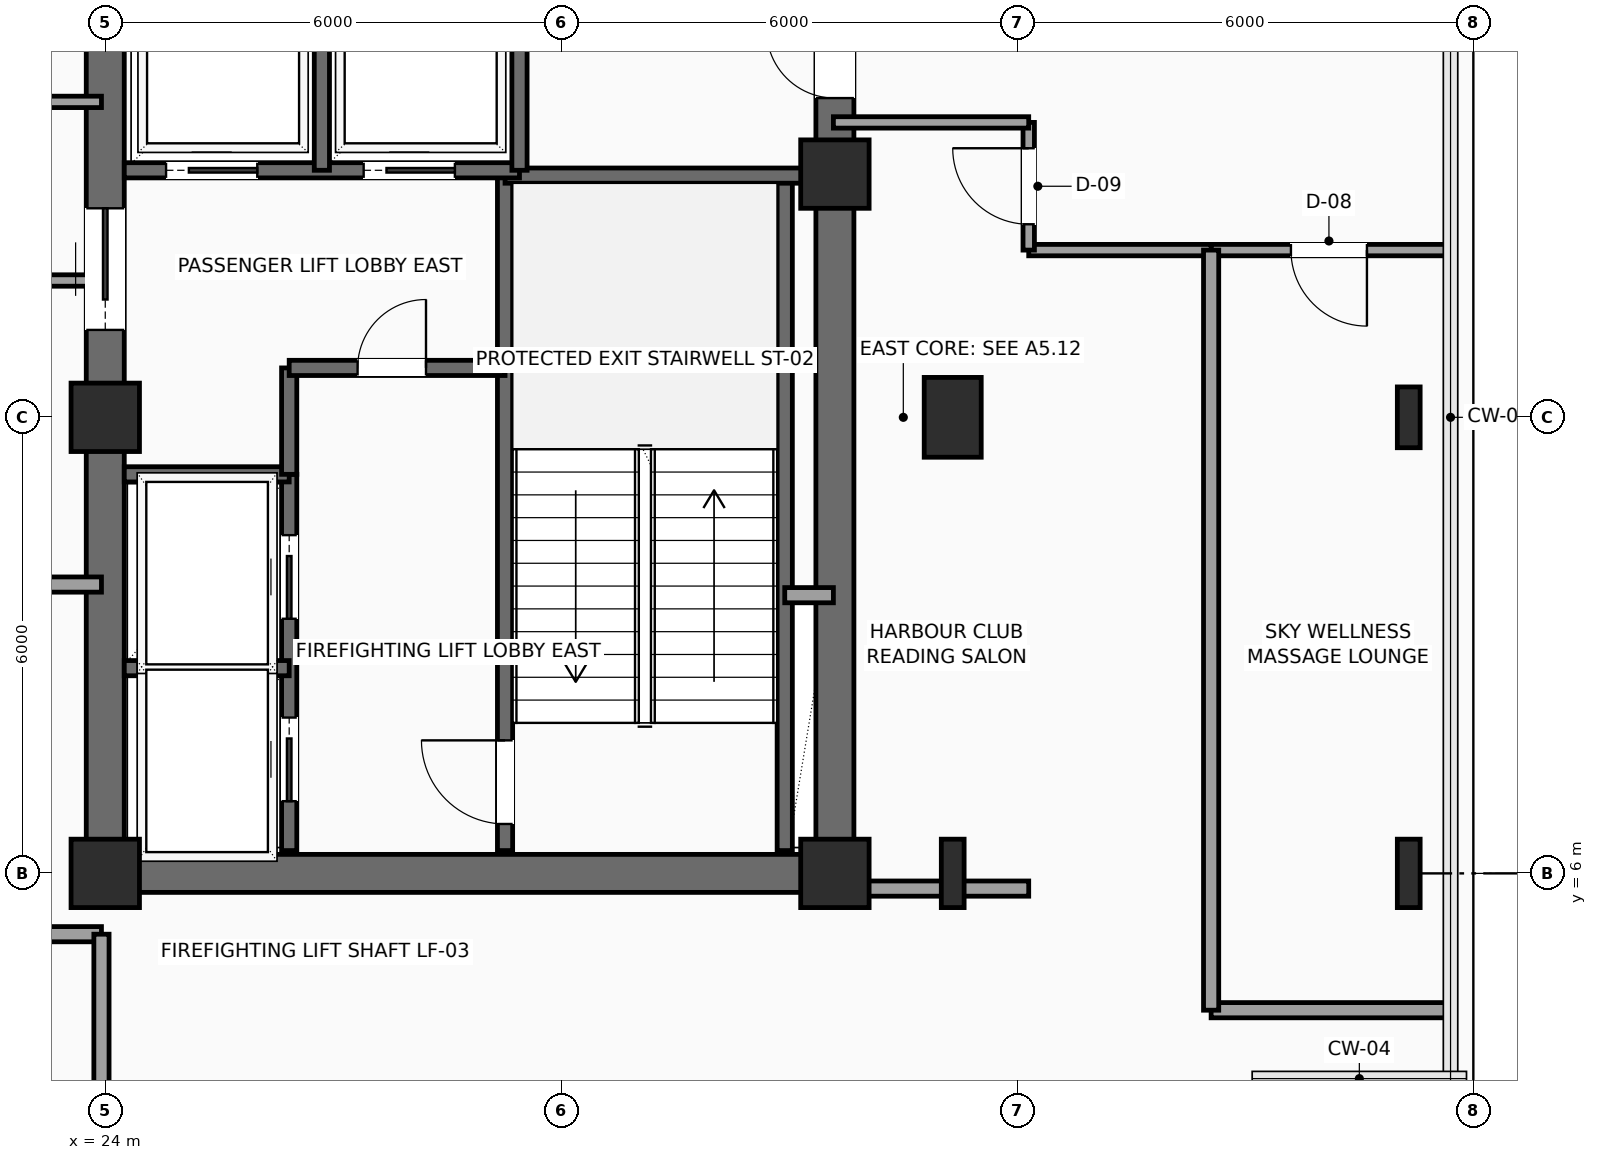
"""IFC4 building model, lengths in metres.
Left out: names, types, materials, properties, quantities, classifications, styles, units other than length and angle.
Written with IfcOpenShell. Run it as: python <this file> out.ifc"""

import sys

from ifc_helpers import new_model, si_unit, direction, frame, frame_2d, origin, origin_2d, place, context, subcontext, project, spatial, rectangle, i_section, extrude, element, fill, save


model = new_model("IFC4")
c1 = context("Model", 3, precision=1e-05, world=origin(), true_north=direction((0.0, 1.0)))
c2 = subcontext(c1, "Body", "Model", "MODEL_VIEW")
j1 = project(units=[si_unit("LENGTHUNIT", "METRE"), si_unit("PLANEANGLEUNIT", "RADIAN")], contexts=[c1])
p1 = place(None, origin())
s1 = spatial("IfcSite", under=j1, at=p1, CompositionType="ELEMENT")
p2 = place(p1, origin())
s2 = spatial("IfcBuilding", under=s1, at=p2, CompositionType="ELEMENT")
p3 = place(p2, frame((0.0, 0.0, 227.4)))
s3 = spatial("IfcBuildingStorey", under=s2, at=p3, CompositionType="ELEMENT", Elevation=227.4)
for number, where, z_axis, x_axis in (
    (1, (24.0, 6.0, 0.0), (0.0, 0.0, 1.0), (1.0, 0.0, 0.0)),
    (2, (24.0, 12.0, 0.0), (0.0, 0.0, 1.0), (1.0, 0.0, 0.0)),
    (3, (33.6, 6.0, 0.0), (0.0, 0.0, 1.0), (1.0, 0.0, 0.0)),
    (4, (33.6, 15.2, 0.0), (0.0, 0.0, 1.0), (1.0, 0.0, 0.0)),
):
    element("IfcColumn", number, at=place(p3, frame(where, z_axis=z_axis, x_axis=x_axis)), inside=s3, PredefinedType="COLUMN", context=c2, shape_type="SweptSolid", body=[
        extrude(rectangle(XDim=0.9, YDim=0.9, at=origin_2d()), origin(), (0.0, 0.0, 1.0), 3.75),
    ])
p4 = place(p3, frame((35.15, 6.0, 0.0), z_axis=(0.0, 0.0, 1.0), x_axis=(1.0, 0.0, 0.0)))
e5 = element("IfcColumn", 5, at=p4, inside=s3, PredefinedType="COLUMN", context=c2, shape_type="SweptSolid", body=[
    extrude(i_section(OverallWidth=0.3, OverallDepth=0.9, WebThickness=0.019, FlangeThickness=0.035, FilletRadius=0.03, at=origin_2d()), origin(), (0.0, 0.0, 1.0), 3.75),
])
p5 = place(p3, frame((35.15, 12.0, 0.0), z_axis=(0.0, 0.0, 1.0), x_axis=(1.0, 0.0, 0.0)))
e6 = element("IfcColumn", 6, at=p5, inside=s3, PredefinedType="COLUMN", context=c2, shape_type="SweptSolid", body=[
    extrude(rectangle(XDim=0.75, YDim=1.05, at=origin_2d()), origin(), (0.0, 0.0, 1.0), 3.75),
])
p6 = place(p3, frame((41.15, 6.0, 0.0), z_axis=(0.0, 0.0, 1.0), x_axis=(1.0, 0.0, 0.0)))
e7 = element("IfcColumn", 7, at=p6, inside=s3, PredefinedType="COLUMN", context=c2, shape_type="SweptSolid", body=[
    extrude(i_section(OverallWidth=0.3, OverallDepth=0.9, WebThickness=0.019, FlangeThickness=0.035, FilletRadius=0.03, at=origin_2d()), origin(), (0.0, 0.0, 1.0), 3.75),
])
p7 = place(p3, frame((41.15, 12.0, 0.0), z_axis=(0.0, 0.0, 1.0), x_axis=(1.0, 0.0, 0.0)))
e8 = element("IfcColumn", 8, at=p7, inside=s3, PredefinedType="COLUMN", context=c2, shape_type="SweptSolid", body=[
    extrude(i_section(OverallWidth=0.3, OverallDepth=0.8, WebThickness=0.018, FlangeThickness=0.033, FilletRadius=0.03, at=origin_2d()), origin(), (0.0, 0.0, 1.0), 3.75),
])
p8 = place(p3, frame((24.0, 6.0, 0.0), z_axis=(0.0, 0.0, 1.0), x_axis=(1.0, 0.0, 0.0)))
e9 = element("IfcWall", 9, at=p8, inside=s3, PredefinedType="SHEAR", context=c2, shape_type="SweptSolid", body=[
    extrude(rectangle(XDim=9.6, YDim=0.5, at=frame_2d((4.8, 0.0))), origin(), (0.0, 0.0, 1.0), 3.54),
])
p9 = place(p3, frame((24.0, 6.0, 0.0), z_axis=(0.0, 0.0, 1.0), x_axis=(0.0, 1.0, 0.0)))
e10 = element("IfcWall", 10, at=p9, inside=s3, PredefinedType="SHEAR", context=c2, shape_type="SweptSolid", body=[
    extrude(rectangle(XDim=12.0, YDim=0.5, at=frame_2d((6.0, 0.0))), origin(), (0.0, 0.0, 1.0), 3.54),
])
p10 = place(p9, frame((7.15, 0.0, 0.0)))
e11 = element("IfcOpeningElement", 11, at=p10, cuts=e10, PredefinedType="OPENING", context=c2, shape_type="SweptSolid", body=[
    extrude(rectangle(XDim=1.6, YDim=2.3, at=frame_2d((0.8, 1.15))), frame((0.0, 0.26, 0.0), z_axis=(0.0, -1.0, 0.0), x_axis=(1.0, 0.0, 0.0)), (0.0, 0.0, 1.0), 0.52),
])
p11 = place(p3, frame((33.6, 6.0, 0.0), z_axis=(0.0, 0.0, 1.0), x_axis=(0.0, 1.0, 0.0)))
e12 = element("IfcWall", 12, at=p11, inside=s3, PredefinedType="SHEAR", context=c2, shape_type="SweptSolid", body=[
    extrude(rectangle(XDim=12.0, YDim=0.5, at=frame_2d((6.0, 0.0))), origin(), (0.0, 0.0, 1.0), 3.54),
])
p12 = place(p11, frame((10.2, 0.0, 0.0)))
e13 = element("IfcOpeningElement", 13, at=p12, cuts=e12, PredefinedType="OPENING", context=c2, shape_type="SweptSolid", body=[
    extrude(rectangle(XDim=0.9, YDim=2.15, at=frame_2d((0.45, 1.075))), frame((0.0, 0.26, 0.0), z_axis=(0.0, -1.0, 0.0), x_axis=(1.0, 0.0, 0.0)), (0.0, 0.0, 1.0), 0.52),
])
p13 = place(p3, frame((29.26, 6.3, 0.0), z_axis=(0.0, 0.0, 1.0), x_axis=(0.0, 1.0, 0.0)))
e14 = element("IfcWall", 14, at=p13, inside=s3, PredefinedType="SHEAR", context=c2, shape_type="SweptSolid", body=[
    extrude(rectangle(XDim=8.88, YDim=0.2, at=frame_2d((4.44, 0.0))), origin(), (0.0, 0.0, 1.0), 3.54),
])
p14 = place(p13, frame((0.35, 0.0, 0.0)))
e15 = element("IfcOpeningElement", 15, at=p14, cuts=e14, PredefinedType="OPENING", context=c2, shape_type="SweptSolid", body=[
    extrude(rectangle(XDim=1.1, YDim=2.2, at=frame_2d((0.55, 1.1))), frame((0.0, 0.11, 0.0), z_axis=(0.0, -1.0, 0.0), x_axis=(1.0, 0.0, 0.0)), (0.0, 0.0, 1.0), 0.22),
])
p15 = place(p3, frame((32.94, 6.3, 0.0), z_axis=(0.0, 0.0, 1.0), x_axis=(0.0, 1.0, 0.0)))
e16 = element("IfcWall", 16, at=p15, inside=s3, PredefinedType="SHEAR", context=c2, shape_type="SweptSolid", body=[
    extrude(rectangle(XDim=8.88, YDim=0.2, at=frame_2d((4.44, 0.0))), origin(), (0.0, 0.0, 1.0), 3.54),
])
p16 = place(p3, frame((29.26, 15.18, 0.0), z_axis=(0.0, 0.0, 1.0), x_axis=(1.0, 0.0, 0.0)))
e17 = element("IfcWall", 17, at=p16, inside=s3, PredefinedType="SHEAR", context=c2, shape_type="SweptSolid", body=[
    extrude(rectangle(XDim=4.04, YDim=0.2, at=frame_2d((2.02, 0.0))), origin(), (0.0, 0.0, 1.0), 3.54),
])
p17 = place(p3, frame((26.42, 6.3, 0.0), z_axis=(0.0, 0.0, 1.0), x_axis=(0.0, 1.0, 0.0)))
e18 = element("IfcWall", 18, at=p17, inside=s3, PredefinedType="SHEAR", context=c2, shape_type="SweptSolid", body=[
    extrude(rectangle(XDim=4.95, YDim=0.2, at=frame_2d((2.475, 0.0))), origin(), (0.0, 0.0, 1.0), 3.54),
])
p18 = place(p17, frame((0.65, 0.0, 0.0)))
e19 = element("IfcOpeningElement", 19, at=p18, cuts=e18, PredefinedType="OPENING", context=c2, shape_type="SweptSolid", body=[
    extrude(rectangle(XDim=1.1, YDim=2.2, at=frame_2d((0.55, 1.1))), frame((0.0, 0.11, 0.0), z_axis=(0.0, -1.0, 0.0), x_axis=(1.0, 0.0, 0.0)), (0.0, 0.0, 1.0), 0.22),
])
p19 = place(p17, frame((3.05, 0.0, 0.0)))
e20 = element("IfcOpeningElement", 20, at=p19, cuts=e18, PredefinedType="OPENING", context=c2, shape_type="SweptSolid", body=[
    extrude(rectangle(XDim=1.1, YDim=2.2, at=frame_2d((0.55, 1.1))), frame((0.0, 0.11, 0.0), z_axis=(0.0, -1.0, 0.0), x_axis=(1.0, 0.0, 0.0)), (0.0, 0.0, 1.0), 0.22),
])
for number, where, z_axis, x_axis in (
    (21, (24.25, 8.7, 0.0), (0.0, 0.0, 1.0), (1.0, 0.0, 0.0)),
    (22, (24.25, 11.25, 0.0), (0.0, 0.0, 1.0), (1.0, 0.0, 0.0)),
):
    element("IfcWall", number, at=place(p3, frame(where, z_axis=z_axis, x_axis=x_axis)), inside=s3, PredefinedType="SHEAR", context=c2, shape_type="SweptSolid", body=[
        extrude(rectangle(XDim=2.17, YDim=0.2, at=frame_2d((1.085, 0.0))), origin(), (0.0, 0.0, 1.0), 3.54),
    ])
p20 = place(p3, frame((26.42, 11.25, 0.0), z_axis=(0.0, 0.0, 1.0), x_axis=(0.0, 1.0, 0.0)))
e23 = element("IfcWall", 23, at=p20, inside=s3, PredefinedType="SHEAR", context=c2, shape_type="SweptSolid", body=[
    extrude(rectangle(XDim=1.4, YDim=0.2, at=frame_2d((0.7, 0.0))), origin(), (0.0, 0.0, 1.0), 3.54),
])
p21 = place(p3, frame((26.42, 12.65, 0.0), z_axis=(0.0, 0.0, 1.0), x_axis=(1.0, 0.0, 0.0)))
e24 = element("IfcWall", 24, at=p21, inside=s3, PredefinedType="SHEAR", context=c2, shape_type="SweptSolid", body=[
    extrude(rectangle(XDim=2.84, YDim=0.2, at=frame_2d((1.42, 0.0))), origin(), (0.0, 0.0, 1.0), 3.54),
])
p22 = place(p21, frame((0.9, 0.0, 0.0)))
e25 = element("IfcOpeningElement", 25, at=p22, cuts=e24, PredefinedType="OPENING", context=c2, shape_type="SweptSolid", body=[
    extrude(rectangle(XDim=0.9, YDim=2.15, at=frame_2d((0.45, 1.075))), frame((0.0, 0.11, 0.0), z_axis=(0.0, -1.0, 0.0), x_axis=(1.0, 0.0, 0.0)), (0.0, 0.0, 1.0), 0.22),
])
p23 = place(p3, frame((32.94, 9.66, 0.0), z_axis=(0.0, 0.0, 1.0), x_axis=(1.0, 0.0, 0.0)))
e26 = element("IfcWall", 26, at=p23, inside=s3, PredefinedType="SOLIDWALL", context=c2, shape_type="SweptSolid", body=[
    extrude(rectangle(XDim=0.64, YDim=0.2, at=frame_2d((0.32, 0.0))), origin(), (0.0, 0.0, 1.0), 3.54),
])
p24 = place(p3, frame((24.25, 15.25, 0.0), z_axis=(0.0, 0.0, 1.0), x_axis=(1.0, 0.0, 0.0)))
e27 = element("IfcWall", 27, at=p24, inside=s3, PredefinedType="SHEAR", context=c2, shape_type="SweptSolid", body=[
    extrude(rectangle(XDim=5.2, YDim=0.2, at=frame_2d((2.6, 0.0))), origin(), (0.0, 0.0, 1.0), 3.54),
])
p25 = place(p24, frame((0.55, 0.0, 0.0)))
e28 = element("IfcOpeningElement", 28, at=p25, cuts=e27, PredefinedType="OPENING", context=c2, shape_type="SweptSolid", body=[
    extrude(rectangle(XDim=1.2, YDim=2.2, at=frame_2d((0.6, 1.1))), frame((0.0, 0.11, 0.0), z_axis=(0.0, -1.0, 0.0), x_axis=(1.0, 0.0, 0.0)), (0.0, 0.0, 1.0), 0.22),
])
p26 = place(p24, frame((3.15, 0.0, 0.0)))
e29 = element("IfcOpeningElement", 29, at=p26, cuts=e27, PredefinedType="OPENING", context=c2, shape_type="SweptSolid", body=[
    extrude(rectangle(XDim=1.2, YDim=2.2, at=frame_2d((0.6, 1.1))), frame((0.0, 0.11, 0.0), z_axis=(0.0, -1.0, 0.0), x_axis=(1.0, 0.0, 0.0)), (0.0, 0.0, 1.0), 0.22),
])
p27 = place(p3, frame((26.85, 15.25, 0.0), z_axis=(0.0, 0.0, 1.0), x_axis=(0.0, 1.0, 0.0)))
e30 = element("IfcWall", 30, at=p27, inside=s3, PredefinedType="SHEAR", context=c2, shape_type="SweptSolid", body=[
    extrude(rectangle(XDim=2.4, YDim=0.2, at=frame_2d((1.2, 0.0))), origin(), (0.0, 0.0, 1.0), 3.54),
])
p28 = place(p3, frame((29.45, 15.25, 0.0), z_axis=(0.0, 0.0, 1.0), x_axis=(0.0, 1.0, 0.0)))
e31 = element("IfcWall", 31, at=p28, inside=s3, PredefinedType="SHEAR", context=c2, shape_type="SweptSolid", body=[
    extrude(rectangle(XDim=2.45, YDim=0.2, at=frame_2d((1.225, 0.0))), origin(), (0.0, 0.0, 1.0), 3.54),
])
p29 = place(p3, frame((41.7, 14.2, 0.0), z_axis=(0.0, 0.0, 1.0), x_axis=(-1.0, 0.0, 0.0)))
e32 = element("IfcWall", 32, at=p29, inside=s3, PredefinedType="PARTITIONING", context=c2, shape_type="SweptSolid", body=[
    extrude(rectangle(XDim=3.15, YDim=0.15, at=frame_2d((1.575, 0.0))), origin(), (0.0, 0.0, 1.0), 3.54),
])
p30 = place(p29, frame((1.1, 0.0, 0.0)))
e33 = element("IfcOpeningElement", 33, at=p30, cuts=e32, PredefinedType="OPENING", context=c2, shape_type="SweptSolid", body=[
    extrude(rectangle(XDim=1.0, YDim=2.2, at=frame_2d((0.5, 1.1))), frame((0.0, 0.085, 0.0), z_axis=(0.0, -1.0, 0.0), x_axis=(1.0, 0.0, 0.0)), (0.0, 0.0, 1.0), 0.17),
])
p31 = place(p3, frame((38.55, 14.2, 0.0), z_axis=(0.0, 0.0, 1.0), x_axis=(-1.0, 0.0, 0.0)))
e34 = element("IfcWall", 34, at=p31, inside=s3, PredefinedType="PARTITIONING", context=c2, shape_type="SweptSolid", body=[
    extrude(rectangle(XDim=2.4, YDim=0.15, at=frame_2d((1.2, 0.0))), origin(), (0.0, 0.0, 1.0), 3.54),
])
p32 = place(p3, frame((36.15, 14.2, 0.0), z_axis=(0.0, 0.0, 1.0), x_axis=(0.0, 1.0, 0.0)))
e35 = element("IfcWall", 35, at=p32, inside=s3, PredefinedType="PARTITIONING", context=c2, shape_type="SweptSolid", body=[
    extrude(rectangle(XDim=1.68, YDim=0.15, at=frame_2d((0.84, 0.0))), origin(), (0.0, 0.0, 1.0), 3.54),
])
p33 = place(p32, frame((0.34, 0.0, 0.0)))
e36 = element("IfcOpeningElement", 36, at=p33, cuts=e35, PredefinedType="OPENING", context=c2, shape_type="SweptSolid", body=[
    extrude(rectangle(XDim=1.0, YDim=2.2, at=frame_2d((0.5, 1.1))), frame((0.0, 0.085, 0.0), z_axis=(0.0, -1.0, 0.0), x_axis=(1.0, 0.0, 0.0)), (0.0, 0.0, 1.0), 0.17),
])
p34 = place(p3, frame((36.15, 15.88, 0.0), z_axis=(0.0, 0.0, 1.0), x_axis=(-1.0, 0.0, 0.0)))
e37 = element("IfcWall", 37, at=p34, inside=s3, PredefinedType="PARTITIONING", context=c2, shape_type="SweptSolid", body=[
    extrude(rectangle(XDim=2.57, YDim=0.15, at=frame_2d((1.285, 0.0))), origin(), (0.0, 0.0, 1.0), 3.54),
])
p35 = place(p3, frame((20.45, 16.15, 0.0), z_axis=(0.0, 0.0, 1.0), x_axis=(1.0, 0.0, 0.0)))
e38 = element("IfcWall", 38, at=p35, inside=s3, PredefinedType="PARTITIONING", context=c2, shape_type="SweptSolid", body=[
    extrude(rectangle(XDim=3.5, YDim=0.15, at=frame_2d((1.75, 0.0))), origin(), (0.0, 0.0, 1.0), 3.54),
])
p36 = place(p3, frame((23.95, 13.8, 0.0), z_axis=(0.0, 0.0, 1.0), x_axis=(-1.0, 0.0, 0.0)))
e39 = element("IfcWall", 39, at=p36, inside=s3, PredefinedType="PARTITIONING", context=c2, shape_type="SweptSolid", body=[
    extrude(rectangle(XDim=9.0, YDim=0.15, at=frame_2d((4.5, 0.0))), origin(), (0.0, 0.0, 1.0), 3.54),
])
p37 = place(p3, frame((33.65, 5.8, 0.0), z_axis=(0.0, 0.0, 1.0), x_axis=(1.0, 0.0, 0.0)))
e40 = element("IfcWall", 40, at=p37, inside=s3, PredefinedType="PARTITIONING", context=c2, shape_type="SweptSolid", body=[
    extrude(rectangle(XDim=2.5, YDim=0.2, at=frame_2d((1.25, 0.0))), origin(), (0.0, 0.0, 1.0), 3.132),
])
p38 = place(p3, frame((14.95, 5.2, 0.0), z_axis=(0.0, 0.0, 1.0), x_axis=(1.0, 0.0, 0.0)))
e41 = element("IfcWall", 41, at=p38, inside=s3, PredefinedType="PARTITIONING", context=c2, shape_type="SweptSolid", body=[
    extrude(rectangle(XDim=9.0, YDim=0.2, at=frame_2d((4.5, 0.0))), origin(), (0.0, 0.0, 1.0), 3.54),
])
p39 = place(p3, frame((23.95, 0.3, 0.0), z_axis=(0.0, 0.0, 1.0), x_axis=(0.0, 1.0, 0.0)))
e42 = element("IfcWall", 42, at=p39, inside=s3, PredefinedType="PARTITIONING", context=c2, shape_type="SweptSolid", body=[
    extrude(rectangle(XDim=4.9, YDim=0.2, at=frame_2d((2.45, 0.0))), origin(), (0.0, 0.0, 1.0), 3.132),
])
p40 = place(p3, frame((14.95, 9.8, 0.0), z_axis=(0.0, 0.0, 1.0), x_axis=(1.0, 0.0, 0.0)))
e43 = element("IfcWall", 43, at=p40, inside=s3, PredefinedType="PARTITIONING", context=c2, shape_type="SweptSolid", body=[
    extrude(rectangle(XDim=9.0, YDim=0.2, at=frame_2d((4.5, 0.0))), origin(), (0.0, 0.0, 1.0), 3.54),
])
p41 = place(p3, frame((38.55, 4.2, 0.0), z_axis=(0.0, 0.0, 1.0), x_axis=(1.0, 0.0, 0.0)))
e44 = element("IfcWall", 44, at=p41, inside=s3, PredefinedType="PARTITIONING", context=c2, shape_type="SweptSolid", body=[
    extrude(rectangle(XDim=3.15, YDim=0.2, at=frame_2d((1.575, 0.0))), origin(), (0.0, 0.0, 1.0), 3.54),
])
p42 = place(p3, frame((38.55, 4.2, 0.0), z_axis=(0.0, 0.0, 1.0), x_axis=(0.0, 1.0, 0.0)))
e45 = element("IfcWall", 45, at=p42, inside=s3, PredefinedType="PARTITIONING", context=c2, shape_type="SweptSolid", body=[
    extrude(rectangle(XDim=10.0, YDim=0.2, at=frame_2d((5.0, 0.0))), origin(), (0.0, 0.0, 1.0), 3.54),
])
p43 = place(p10, origin())
e46 = element("IfcDoor", 46, at=p43, inside=s3, OperationType="DOUBLE_DOOR_SLIDING", PredefinedType="DOOR", context=c2, shape_type="SweptSolid", body=[
    extrude(rectangle(XDim=1.6, YDim=2.3, at=frame_2d((0.8, 1.15))), frame((0.0, 0.025, 0.0), z_axis=(0.0, -1.0, 0.0), x_axis=(1.0, 0.0, 0.0)), (0.0, 0.0, 1.0), 0.05),
])
fill(e11, e46)
p44 = place(p12, origin())
e47 = element("IfcDoor", 47, at=p44, inside=s3, OperationType="SINGLE_SWING_RIGHT", PredefinedType="DOOR", context=c2, shape_type="SweptSolid", body=[
    extrude(rectangle(XDim=0.9, YDim=2.15, at=frame_2d((0.45, 1.075))), frame((0.0, 0.025, 0.0), z_axis=(0.0, -1.0, 0.0), x_axis=(1.0, 0.0, 0.0)), (0.0, 0.0, 1.0), 0.05),
])
fill(e13, e47)
p45 = place(p14, origin())
e48 = element("IfcDoor", 48, at=p45, inside=s3, OperationType="SINGLE_SWING_RIGHT", PredefinedType="DOOR", context=c2, shape_type="SweptSolid", body=[
    extrude(rectangle(XDim=1.1, YDim=2.2, at=frame_2d((0.55, 1.1))), frame((0.0, 0.025, 0.0), z_axis=(0.0, -1.0, 0.0), x_axis=(1.0, 0.0, 0.0)), (0.0, 0.0, 1.0), 0.05),
])
fill(e15, e48)
p46 = place(p18, origin())
e49 = element("IfcDoor", 49, at=p46, inside=s3, OperationType="SLIDING_TO_LEFT", PredefinedType="DOOR", context=c2, shape_type="SweptSolid", body=[
    extrude(rectangle(XDim=1.1, YDim=2.2, at=frame_2d((0.55, 1.1))), frame((0.0, 0.025, 0.0), z_axis=(0.0, -1.0, 0.0), x_axis=(1.0, 0.0, 0.0)), (0.0, 0.0, 1.0), 0.05),
])
fill(e19, e49)
p47 = place(p19, origin())
e50 = element("IfcDoor", 50, at=p47, inside=s3, OperationType="SLIDING_TO_LEFT", PredefinedType="DOOR", context=c2, shape_type="SweptSolid", body=[
    extrude(rectangle(XDim=1.1, YDim=2.2, at=frame_2d((0.55, 1.1))), frame((0.0, 0.025, 0.0), z_axis=(0.0, -1.0, 0.0), x_axis=(1.0, 0.0, 0.0)), (0.0, 0.0, 1.0), 0.05),
])
fill(e20, e50)
p48 = place(p22, origin())
e51 = element("IfcDoor", 51, at=p48, inside=s3, OperationType="SINGLE_SWING_RIGHT", PredefinedType="DOOR", context=c2, shape_type="SweptSolid", body=[
    extrude(rectangle(XDim=0.9, YDim=2.15, at=frame_2d((0.45, 1.075))), frame((0.0, 0.025, 0.0), z_axis=(0.0, -1.0, 0.0), x_axis=(1.0, 0.0, 0.0)), (0.0, 0.0, 1.0), 0.05),
])
fill(e25, e51)
p49 = place(p25, origin())
e52 = element("IfcDoor", 52, at=p49, inside=s3, OperationType="SLIDING_TO_RIGHT", PredefinedType="DOOR", context=c2, shape_type="SweptSolid", body=[
    extrude(rectangle(XDim=1.2, YDim=2.2, at=frame_2d((0.6, 1.1))), frame((0.0, 0.025, 0.0), z_axis=(0.0, -1.0, 0.0), x_axis=(1.0, 0.0, 0.0)), (0.0, 0.0, 1.0), 0.05),
])
fill(e28, e52)
p50 = place(p26, origin())
e53 = element("IfcDoor", 53, at=p50, inside=s3, OperationType="SLIDING_TO_RIGHT", PredefinedType="DOOR", context=c2, shape_type="SweptSolid", body=[
    extrude(rectangle(XDim=1.2, YDim=2.2, at=frame_2d((0.6, 1.1))), frame((0.0, 0.025, 0.0), z_axis=(0.0, -1.0, 0.0), x_axis=(1.0, 0.0, 0.0)), (0.0, 0.0, 1.0), 0.05),
])
fill(e29, e53)
p51 = place(p30, origin())
e54 = element("IfcDoor", 54, at=p51, inside=s3, OperationType="SINGLE_SWING_LEFT", PredefinedType="DOOR", context=c2, shape_type="SweptSolid", body=[
    extrude(rectangle(XDim=1.0, YDim=2.2, at=frame_2d((0.5, 1.1))), frame((0.0, 0.025, 0.0), z_axis=(0.0, -1.0, 0.0), x_axis=(1.0, 0.0, 0.0)), (0.0, 0.0, 1.0), 0.05),
])
fill(e33, e54)
p52 = place(p33, origin())
e55 = element("IfcDoor", 55, at=p52, inside=s3, OperationType="SINGLE_SWING_RIGHT", PredefinedType="DOOR", context=c2, shape_type="SweptSolid", body=[
    extrude(rectangle(XDim=1.0, YDim=2.2, at=frame_2d((0.5, 1.1))), frame((0.0, 0.025, 0.0), z_axis=(0.0, -1.0, 0.0), x_axis=(1.0, 0.0, 0.0)), (0.0, 0.0, 1.0), 0.05),
])
fill(e36, e55)
save(model, sys.argv[1])
